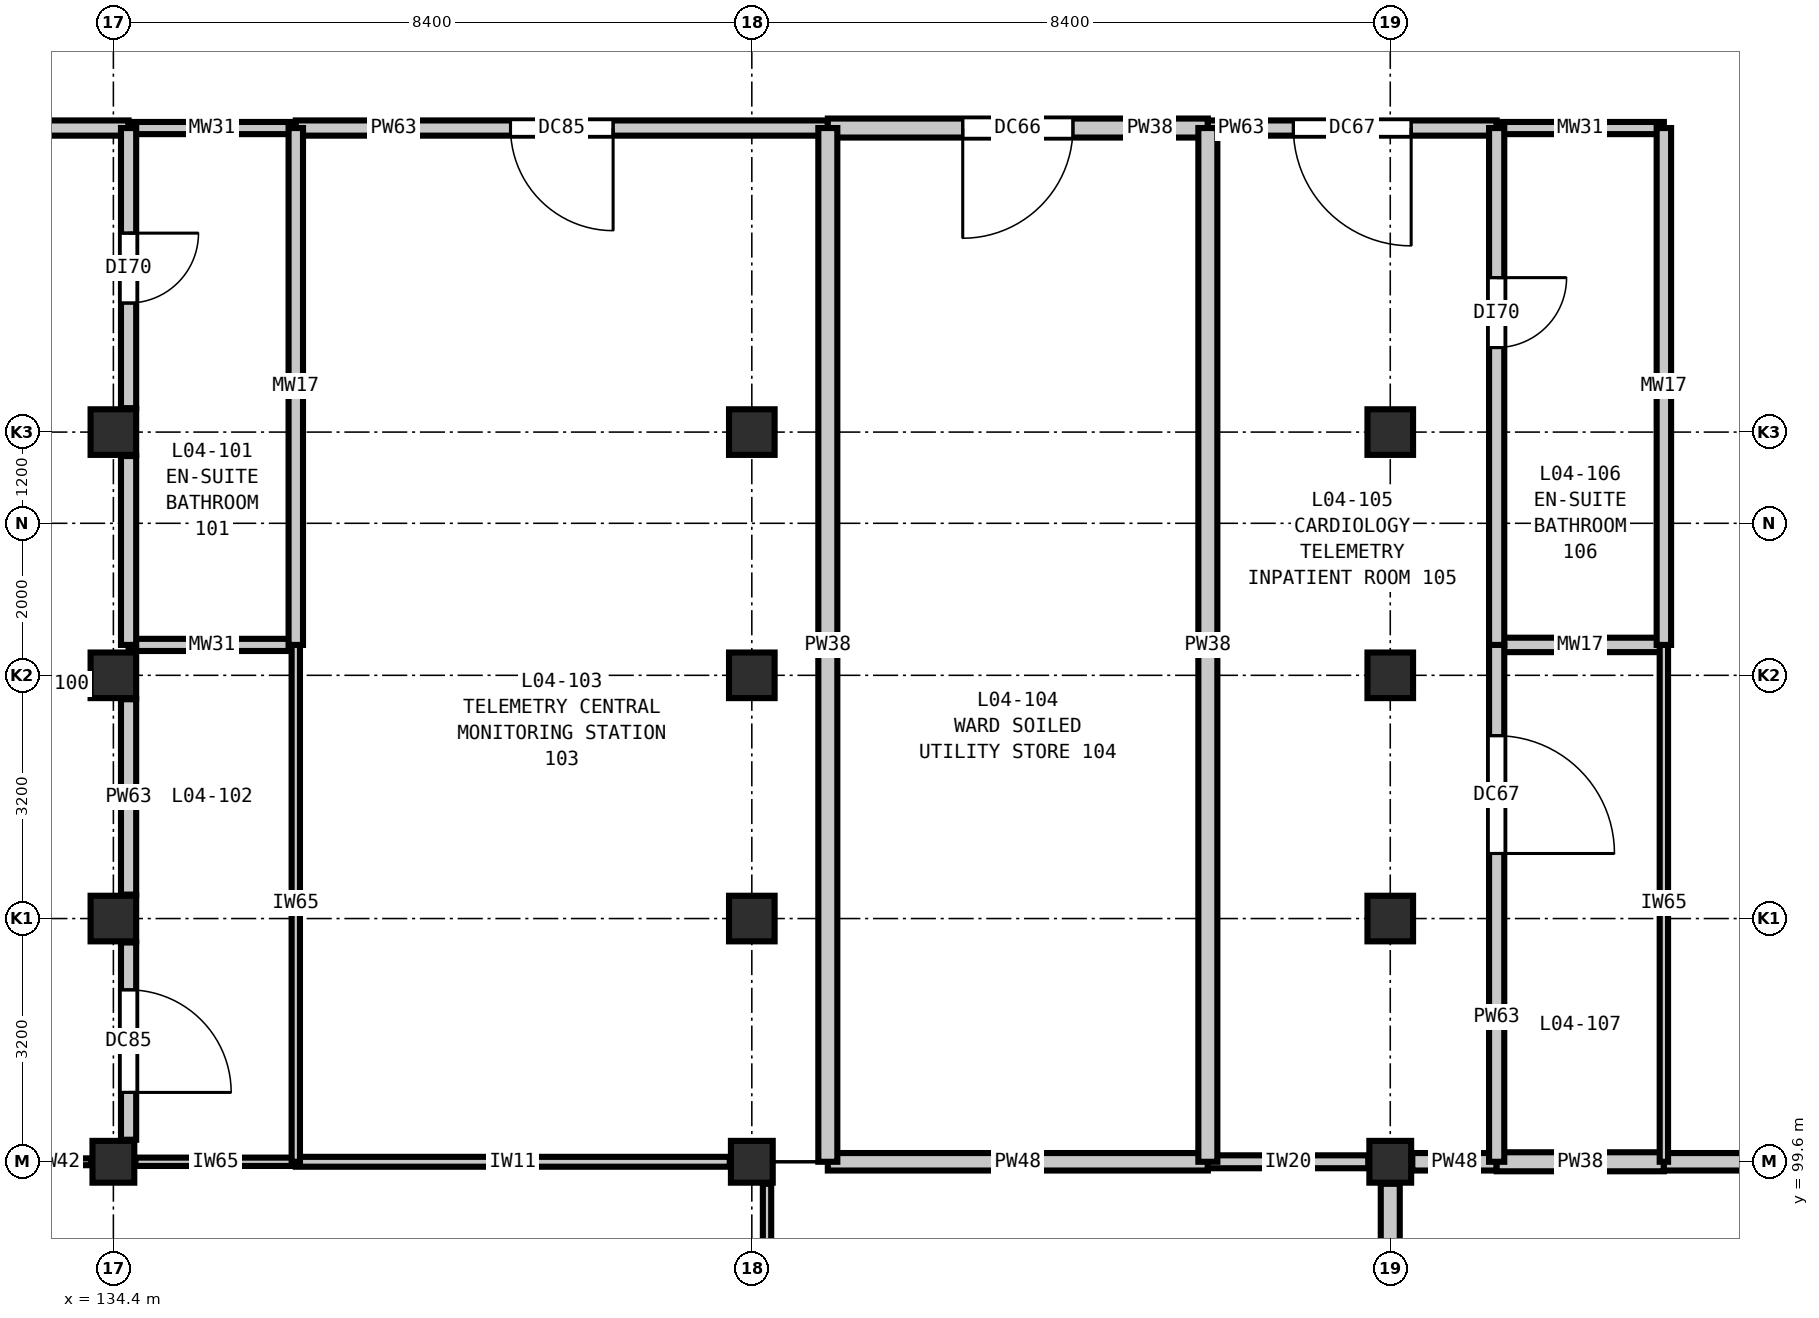
"""IFC4 building model, lengths in metres.
Left out: names, types, materials, properties, quantities, classifications, styles, units other than length and angle.
Written with IfcOpenShell. Run it as: python <this file> out.ifc"""

import sys

from ifc_helpers import new_model, si_unit, direction, frame, frame_2d, origin, origin_2d, place, context, subcontext, project, spatial, rectangle, extrude, element, fill, save


model = new_model("IFC4")
c1 = context("Model", 3, precision=1e-05, world=origin(), true_north=direction((0.0, 1.0)))
c2 = subcontext(c1, "Body", "Model", "MODEL_VIEW")
j1 = project(units=[si_unit("LENGTHUNIT", "METRE"), si_unit("PLANEANGLEUNIT", "RADIAN")], contexts=[c1])
p1 = place(None, origin())
s1 = spatial("IfcSite", under=j1, at=p1, CompositionType="ELEMENT")
p2 = place(p1, origin())
s2 = spatial("IfcBuilding", under=s1, at=p2, CompositionType="ELEMENT")
p3 = place(p2, frame((0.0, 0.0, 20.4)))
s3 = spatial("IfcBuildingStorey", under=s2, at=p3, CompositionType="ELEMENT", Elevation=20.4)
p4 = place(p3, frame((134.4, 99.6, 0.0), z_axis=(0.0, 0.0, 1.0), x_axis=(1.0, 0.0, 0.0)))
e1 = element("IfcColumn", 1, at=p4, inside=s3, PredefinedType="COLUMN", context=c2, shape_type="SweptSolid", body=[
    extrude(rectangle(XDim=0.55, YDim=0.55, at=origin_2d()), origin(), (0.0, 0.0, 1.0), 4.2),
])
for number, where, z_axis, x_axis in (
    (2, (134.4, 102.8, 0.0), (0.0, 0.0, 1.0), (1.0, 0.0, 0.0)),
    (3, (134.4, 106.0, 0.0), (0.0, 0.0, 1.0), (1.0, 0.0, 0.0)),
    (4, (134.4, 109.2, 0.0), (0.0, 0.0, 1.0), (1.0, 0.0, 0.0)),
):
    element("IfcColumn", number, at=place(p3, frame(where, z_axis=z_axis, x_axis=x_axis)), inside=s3, PredefinedType="COLUMN", context=c2, shape_type="SweptSolid", body=[
        extrude(rectangle(XDim=0.6, YDim=0.6, at=origin_2d()), origin(), (0.0, 0.0, 1.0), 4.2),
    ])
p5 = place(p3, frame((142.8, 99.6, 0.0), z_axis=(0.0, 0.0, 1.0), x_axis=(1.0, 0.0, 0.0)))
e5 = element("IfcColumn", 5, at=p5, inside=s3, PredefinedType="COLUMN", context=c2, shape_type="SweptSolid", body=[
    extrude(rectangle(XDim=0.55, YDim=0.55, at=origin_2d()), origin(), (0.0, 0.0, 1.0), 4.2),
])
for number, where, z_axis, x_axis in (
    (6, (142.8, 102.8, 0.0), (0.0, 0.0, 1.0), (1.0, 0.0, 0.0)),
    (7, (142.8, 106.0, 0.0), (0.0, 0.0, 1.0), (1.0, 0.0, 0.0)),
    (8, (142.8, 109.2, 0.0), (0.0, 0.0, 1.0), (1.0, 0.0, 0.0)),
):
    element("IfcColumn", number, at=place(p3, frame(where, z_axis=z_axis, x_axis=x_axis)), inside=s3, PredefinedType="COLUMN", context=c2, shape_type="SweptSolid", body=[
        extrude(rectangle(XDim=0.6, YDim=0.6, at=origin_2d()), origin(), (0.0, 0.0, 1.0), 4.2),
    ])
p6 = place(p3, frame((151.2, 99.6, 0.0), z_axis=(0.0, 0.0, 1.0), x_axis=(1.0, 0.0, 0.0)))
e9 = element("IfcColumn", 9, at=p6, inside=s3, PredefinedType="COLUMN", context=c2, shape_type="SweptSolid", body=[
    extrude(rectangle(XDim=0.55, YDim=0.55, at=origin_2d()), origin(), (0.0, 0.0, 1.0), 4.2),
])
for number, where, z_axis, x_axis in (
    (10, (151.2, 102.8, 0.0), (0.0, 0.0, 1.0), (1.0, 0.0, 0.0)),
    (11, (151.2, 106.0, 0.0), (0.0, 0.0, 1.0), (1.0, 0.0, 0.0)),
    (12, (151.2, 109.2, 0.0), (0.0, 0.0, 1.0), (1.0, 0.0, 0.0)),
):
    element("IfcColumn", number, at=place(p3, frame(where, z_axis=z_axis, x_axis=x_axis)), inside=s3, PredefinedType="COLUMN", context=c2, shape_type="SweptSolid", body=[
        extrude(rectangle(XDim=0.6, YDim=0.6, at=origin_2d()), origin(), (0.0, 0.0, 1.0), 4.2),
    ])
p7 = place(p3, frame((133.2, 99.6, 0.0), z_axis=(0.0, 0.0, 1.0), x_axis=(1.0, 0.0, 0.0)))
e13 = element("IfcWall", 13, at=p7, inside=s3, PredefinedType="PARTITIONING", context=c2, shape_type="SweptSolid", body=[
    extrude(rectangle(XDim=0.91, YDim=0.09, at=frame_2d((0.455, 0.0))), origin(), (0.0, 0.0, 1.0), 3.585),
])
p8 = place(p3, frame((134.69, 99.6, 0.0), z_axis=(0.0, 0.0, 1.0), x_axis=(1.0, 0.0, 0.0)))
e14 = element("IfcWall", 14, at=p8, inside=s3, PredefinedType="PARTITIONING", context=c2, shape_type="SweptSolid", body=[
    extrude(rectangle(XDim=2.11, YDim=0.11, at=frame_2d((1.055, 0.0))), origin(), (0.0, 0.0, 1.0), 3.585),
])
p9 = place(p3, frame((136.8, 99.6, 0.0), z_axis=(0.0, 0.0, 1.0), x_axis=(1.0, 0.0, 0.0)))
e15 = element("IfcWall", 15, at=p9, inside=s3, PredefinedType="PARTITIONING", context=c2, shape_type="SweptSolid", body=[
    extrude(rectangle(XDim=5.71, YDim=0.13, at=frame_2d((2.855, 0.0))), origin(), (0.0, 0.0, 1.0), 3.585),
])
p10 = place(p3, frame((143.8, 99.6, 0.0), z_axis=(0.0, 0.0, 1.0), x_axis=(1.0, 0.0, 0.0)))
e16 = element("IfcWall", 16, at=p10, inside=s3, PredefinedType="PARTITIONING", context=c2, shape_type="SweptSolid", body=[
    extrude(rectangle(XDim=5.0, YDim=0.23, at=frame_2d((2.5, 0.0))), origin(), (0.0, 0.0, 1.0), 3.585),
])
p11 = place(p3, frame((148.8, 99.6, 0.0), z_axis=(0.0, 0.0, 1.0), x_axis=(1.0, 0.0, 0.0)))
e17 = element("IfcWall", 17, at=p11, inside=s3, PredefinedType="PARTITIONING", context=c2, shape_type="SweptSolid", body=[
    extrude(rectangle(XDim=2.11, YDim=0.17, at=frame_2d((1.055, 0.0))), origin(), (0.0, 0.0, 1.0), 3.585),
])
p12 = place(p3, frame((151.49, 99.6, 0.0), z_axis=(0.0, 0.0, 1.0), x_axis=(1.0, 0.0, 0.0)))
e18 = element("IfcWall", 18, at=p12, inside=s3, PredefinedType="PARTITIONING", context=c2, shape_type="SweptSolid", body=[
    extrude(rectangle(XDim=1.11, YDim=0.23, at=frame_2d((0.555, 0.0))), origin(), (0.0, 0.0, 1.0), 3.585),
])
p13 = place(p3, frame((152.6, 99.6, 0.0), z_axis=(0.0, 0.0, 1.0), x_axis=(1.0, 0.0, 0.0)))
e19 = element("IfcWall", 19, at=p13, inside=s3, PredefinedType="PARTITIONING", context=c2, shape_type="SweptSolid", body=[
    extrude(rectangle(XDim=2.2, YDim=0.25, at=frame_2d((1.1, 0.0))), origin(), (0.0, 0.0, 1.0), 3.585),
])
p14 = place(p3, frame((154.8, 99.6, 0.0), z_axis=(0.0, 0.0, 1.0), x_axis=(1.0, 0.0, 0.0)))
e20 = element("IfcWall", 20, at=p14, inside=s3, PredefinedType="PARTITIONING", context=c2, shape_type="SweptSolid", body=[
    extrude(rectangle(XDim=4.485, YDim=0.23, at=frame_2d((2.242, 0.0))), origin(), (0.0, 0.0, 1.0), 3.585),
])
p15 = place(p3, frame((134.6, 106.4, 0.0), z_axis=(0.0, 0.0, 1.0), x_axis=(1.0, 0.0, 0.0)))
e21 = element("IfcWall", 21, at=p15, inside=s3, PredefinedType="PLUMBINGWALL", context=c2, shape_type="SweptSolid", body=[
    extrude(rectangle(XDim=2.2, YDim=0.16, at=frame_2d((1.1, 0.0))), origin(), (0.0, 0.0, 1.0), 3.82),
])
p16 = place(p3, frame((152.6, 106.4, 0.0), z_axis=(0.0, 0.0, 1.0), x_axis=(1.0, 0.0, 0.0)))
e22 = element("IfcWall", 22, at=p16, inside=s3, PredefinedType="PLUMBINGWALL", context=c2, shape_type="SweptSolid", body=[
    extrude(rectangle(XDim=2.2, YDim=0.19, at=frame_2d((1.1, 0.0))), origin(), (0.0, 0.0, 1.0), 3.82),
])
p17 = place(p3, frame((130.8, 113.2, 0.0), z_axis=(0.0, 0.0, 1.0), x_axis=(1.0, 0.0, 0.0)))
e23 = element("IfcWall", 23, at=p17, inside=s3, PredefinedType="PARTITIONING", context=c2, shape_type="SweptSolid", body=[
    extrude(rectangle(XDim=3.8, YDim=0.2, at=frame_2d((1.9, 0.0))), origin(), (0.0, 0.0, 1.0), 3.82),
])
p18 = place(p17, frame((1.25, 0.0, 0.0)))
e24 = element("IfcOpeningElement", 24, at=p18, cuts=e23, PredefinedType="OPENING", context=c2, shape_type="SweptSolid", body=[
    extrude(rectangle(XDim=1.3, YDim=2.2, at=frame_2d((0.65, 1.1))), frame((0.0, 0.11, 0.0), z_axis=(0.0, -1.0, 0.0), x_axis=(1.0, 0.0, 0.0)), (0.0, 0.0, 1.0), 0.22),
])
p19 = place(p3, frame((134.6, 113.2, 0.0), z_axis=(0.0, 0.0, 1.0), x_axis=(1.0, 0.0, 0.0)))
e25 = element("IfcWall", 25, at=p19, inside=s3, PredefinedType="PLUMBINGWALL", context=c2, shape_type="SweptSolid", body=[
    extrude(rectangle(XDim=2.2, YDim=0.16, at=frame_2d((1.1, 0.0))), origin(), (0.0, 0.0, 1.0), 3.82),
])
p20 = place(p3, frame((136.8, 113.2, 0.0), z_axis=(0.0, 0.0, 1.0), x_axis=(1.0, 0.0, 0.0)))
e26 = element("IfcWall", 26, at=p20, inside=s3, PredefinedType="PARTITIONING", context=c2, shape_type="SweptSolid", body=[
    extrude(rectangle(XDim=7.0, YDim=0.2, at=frame_2d((3.5, 0.0))), origin(), (0.0, 0.0, 1.0), 3.82),
])
p21 = place(p20, frame((2.825, 0.0, 0.0)))
e27 = element("IfcOpeningElement", 27, at=p21, cuts=e26, PredefinedType="OPENING", context=c2, shape_type="SweptSolid", body=[
    extrude(rectangle(XDim=1.35, YDim=2.2, at=frame_2d((0.675, 1.1))), frame((0.0, 0.11, 0.0), z_axis=(0.0, -1.0, 0.0), x_axis=(1.0, 0.0, 0.0)), (0.0, 0.0, 1.0), 0.22),
])
p22 = place(p3, frame((143.8, 113.2, 0.0), z_axis=(0.0, 0.0, 1.0), x_axis=(1.0, 0.0, 0.0)))
e28 = element("IfcWall", 28, at=p22, inside=s3, PredefinedType="PARTITIONING", context=c2, shape_type="SweptSolid", body=[
    extrude(rectangle(XDim=5.0, YDim=0.25, at=frame_2d((2.5, 0.0))), origin(), (0.0, 0.0, 1.0), 3.82),
])
p23 = place(p22, frame((1.775, 0.0, 0.0)))
e29 = element("IfcOpeningElement", 29, at=p23, cuts=e28, PredefinedType="OPENING", context=c2, shape_type="SweptSolid", body=[
    extrude(rectangle(XDim=1.45, YDim=2.25, at=frame_2d((0.725, 1.125))), frame((0.0, 0.135, 0.0), z_axis=(0.0, -1.0, 0.0), x_axis=(1.0, 0.0, 0.0)), (0.0, 0.0, 1.0), 0.27),
])
p24 = place(p3, frame((148.8, 113.2, 0.0), z_axis=(0.0, 0.0, 1.0), x_axis=(1.0, 0.0, 0.0)))
e30 = element("IfcWall", 30, at=p24, inside=s3, PredefinedType="PARTITIONING", context=c2, shape_type="SweptSolid", body=[
    extrude(rectangle(XDim=3.8, YDim=0.2, at=frame_2d((1.9, 0.0))), origin(), (0.0, 0.0, 1.0), 3.82),
])
p25 = place(p24, frame((1.125, 0.0, 0.0)))
e31 = element("IfcOpeningElement", 31, at=p25, cuts=e30, PredefinedType="OPENING", context=c2, shape_type="SweptSolid", body=[
    extrude(rectangle(XDim=1.55, YDim=2.25, at=frame_2d((0.775, 1.125))), frame((0.0, 0.11, 0.0), z_axis=(0.0, -1.0, 0.0), x_axis=(1.0, 0.0, 0.0)), (0.0, 0.0, 1.0), 0.22),
])
p26 = place(p3, frame((152.6, 113.2, 0.0), z_axis=(0.0, 0.0, 1.0), x_axis=(1.0, 0.0, 0.0)))
e32 = element("IfcWall", 32, at=p26, inside=s3, PredefinedType="PLUMBINGWALL", context=c2, shape_type="SweptSolid", body=[
    extrude(rectangle(XDim=2.2, YDim=0.16, at=frame_2d((1.1, 0.0))), origin(), (0.0, 0.0, 1.0), 3.82),
])
p27 = place(p3, frame((134.6, 99.89, 0.0), z_axis=(0.0, 0.0, 1.0), x_axis=(0.0, 1.0, 0.0)))
e33 = element("IfcWall", 33, at=p27, inside=s3, PredefinedType="PARTITIONING", context=c2, shape_type="SweptSolid", body=[
    extrude(rectangle(XDim=2.595, YDim=0.2, at=frame_2d((1.298, 0.0))), origin(), (0.0, 0.0, 1.0), 3.585),
])
p28 = place(p27, frame((0.623, 0.0, 0.0)))
e34 = element("IfcOpeningElement", 34, at=p28, cuts=e33, PredefinedType="OPENING", context=c2, shape_type="SweptSolid", body=[
    extrude(rectangle(XDim=1.35, YDim=2.2, at=frame_2d((0.675, 1.1))), frame((0.0, 0.11, 0.0), z_axis=(0.0, -1.0, 0.0), x_axis=(1.0, 0.0, 0.0)), (0.0, 0.0, 1.0), 0.22),
])
p29 = place(p3, frame((134.6, 103.115, 0.0), z_axis=(0.0, 0.0, 1.0), x_axis=(0.0, 1.0, 0.0)))
e35 = element("IfcWall", 35, at=p29, inside=s3, PredefinedType="PARTITIONING", context=c2, shape_type="SweptSolid", body=[
    extrude(rectangle(XDim=2.57, YDim=0.2, at=frame_2d((1.285, 0.0))), origin(), (0.0, 0.0, 1.0), 3.585),
])
p30 = place(p3, frame((134.6, 109.515, 0.0), z_axis=(0.0, 0.0, 1.0), x_axis=(0.0, 1.0, 0.0)))
e36 = element("IfcWall", 36, at=p30, inside=s3, PredefinedType="PARTITIONING", context=c2, shape_type="SweptSolid", body=[
    extrude(rectangle(XDim=3.685, YDim=0.2, at=frame_2d((1.843, 0.0))), origin(), (0.0, 0.0, 1.0), 3.585),
])
p31 = place(p30, frame((1.383, 0.0, 0.0)))
e37 = element("IfcOpeningElement", 37, at=p31, cuts=e36, PredefinedType="OPENING", context=c2, shape_type="SweptSolid", body=[
    extrude(rectangle(XDim=0.92, YDim=2.1, at=frame_2d((0.46, 1.05))), frame((0.0, 0.11, 0.0), z_axis=(0.0, -1.0, 0.0), x_axis=(1.0, 0.0, 0.0)), (0.0, 0.0, 1.0), 0.22),
])
p32 = place(p3, frame((134.6, 106.4, 0.0), z_axis=(0.0, 0.0, 1.0), x_axis=(0.0, 1.0, 0.0)))
e38 = element("IfcWall", 38, at=p32, inside=s3, PredefinedType="PARTITIONING", context=c2, shape_type="SweptSolid", body=[
    extrude(rectangle(XDim=2.485, YDim=0.2, at=frame_2d((1.243, 0.0))), origin(), (0.0, 0.0, 1.0), 3.585),
])
p33 = place(p3, frame((136.8, 99.6, 0.0), z_axis=(0.0, 0.0, 1.0), x_axis=(0.0, 1.0, 0.0)))
e39 = element("IfcWall", 39, at=p33, inside=s3, PredefinedType="PARTITIONING", context=c2, shape_type="SweptSolid", body=[
    extrude(rectangle(XDim=6.8, YDim=0.11, at=frame_2d((3.4, 0.0))), origin(), (0.0, 0.0, 1.0), 3.82),
])
p34 = place(p3, frame((136.8, 106.4, 0.0), z_axis=(0.0, 0.0, 1.0), x_axis=(0.0, 1.0, 0.0)))
e40 = element("IfcWall", 40, at=p34, inside=s3, PredefinedType="PLUMBINGWALL", context=c2, shape_type="SweptSolid", body=[
    extrude(rectangle(XDim=6.8, YDim=0.19, at=frame_2d((3.4, 0.0))), origin(), (0.0, 0.0, 1.0), 3.82),
])
p35 = place(p3, frame((143.0, 91.49, 0.0), z_axis=(0.0, 0.0, 1.0), x_axis=(0.0, 1.0, 0.0)))
e41 = element("IfcWall", 41, at=p35, inside=s3, PredefinedType="PARTITIONING", context=c2, shape_type="SweptSolid", body=[
    extrude(rectangle(XDim=7.82, YDim=0.11, at=frame_2d((3.91, 0.0))), origin(), (0.0, 0.0, 1.0), 3.585),
])
for number, where, z_axis, x_axis in (
    (42, (143.8, 99.6, 0.0), (0.0, 0.0, 1.0), (0.0, 1.0, 0.0)),
    (43, (148.8, 99.6, 0.0), (0.0, 0.0, 1.0), (0.0, 1.0, 0.0)),
):
    element("IfcWall", number, at=place(p3, frame(where, z_axis=z_axis, x_axis=x_axis)), inside=s3, PredefinedType="PARTITIONING", context=c2, shape_type="SweptSolid", body=[
        extrude(rectangle(XDim=13.6, YDim=0.25, at=frame_2d((6.8, 0.0))), origin(), (0.0, 0.0, 1.0), 3.82),
    ])
p36 = place(p3, frame((151.2, 95.8, 0.0), z_axis=(0.0, 0.0, 1.0), x_axis=(0.0, 1.0, 0.0)))
e44 = element("IfcWall", 44, at=p36, inside=s3, PredefinedType="PARTITIONING", context=c2, shape_type="SweptSolid", body=[
    extrude(rectangle(XDim=3.51, YDim=0.25, at=frame_2d((1.755, 0.0))), origin(), (0.0, 0.0, 1.0), 3.585),
])
p37 = place(p3, frame((152.6, 99.6, 0.0), z_axis=(0.0, 0.0, 1.0), x_axis=(0.0, 1.0, 0.0)))
e45 = element("IfcWall", 45, at=p37, inside=s3, PredefinedType="PARTITIONING", context=c2, shape_type="SweptSolid", body=[
    extrude(rectangle(XDim=6.8, YDim=0.2, at=frame_2d((3.4, 0.0))), origin(), (0.0, 0.0, 1.0), 3.82),
])
p38 = place(p37, frame((4.056, 0.0, 0.0)))
e46 = element("IfcOpeningElement", 46, at=p38, cuts=e45, PredefinedType="OPENING", context=c2, shape_type="SweptSolid", body=[
    extrude(rectangle(XDim=1.55, YDim=2.25, at=frame_2d((0.775, 1.125))), frame((0.0, 0.11, 0.0), z_axis=(0.0, -1.0, 0.0), x_axis=(1.0, 0.0, 0.0)), (0.0, 0.0, 1.0), 0.22),
])
p39 = place(p3, frame((152.6, 106.4, 0.0), z_axis=(0.0, 0.0, 1.0), x_axis=(0.0, 1.0, 0.0)))
e47 = element("IfcWall", 47, at=p39, inside=s3, PredefinedType="PARTITIONING", context=c2, shape_type="SweptSolid", body=[
    extrude(rectangle(XDim=6.8, YDim=0.2, at=frame_2d((3.4, 0.0))), origin(), (0.0, 0.0, 1.0), 3.82),
])
p40 = place(p39, frame((3.912, 0.0, 0.0)))
e48 = element("IfcOpeningElement", 48, at=p40, cuts=e47, PredefinedType="OPENING", context=c2, shape_type="SweptSolid", body=[
    extrude(rectangle(XDim=0.92, YDim=2.1, at=frame_2d((0.46, 1.05))), frame((0.0, 0.11, 0.0), z_axis=(0.0, -1.0, 0.0), x_axis=(1.0, 0.0, 0.0)), (0.0, 0.0, 1.0), 0.22),
])
p41 = place(p3, frame((154.8, 99.6, 0.0), z_axis=(0.0, 0.0, 1.0), x_axis=(0.0, 1.0, 0.0)))
e49 = element("IfcWall", 49, at=p41, inside=s3, PredefinedType="PARTITIONING", context=c2, shape_type="SweptSolid", body=[
    extrude(rectangle(XDim=6.8, YDim=0.11, at=frame_2d((3.4, 0.0))), origin(), (0.0, 0.0, 1.0), 3.82),
])
p42 = place(p3, frame((154.8, 106.4, 0.0), z_axis=(0.0, 0.0, 1.0), x_axis=(0.0, 1.0, 0.0)))
e50 = element("IfcWall", 50, at=p42, inside=s3, PredefinedType="PLUMBINGWALL", context=c2, shape_type="SweptSolid", body=[
    extrude(rectangle(XDim=6.8, YDim=0.19, at=frame_2d((3.4, 0.0))), origin(), (0.0, 0.0, 1.0), 3.82),
])
p43 = place(p21, frame((1.35, 0.0, 0.0), z_axis=(0.0, 0.0, 1.0), x_axis=(-1.0, 0.0, 0.0)))
e51 = element("IfcDoor", 51, at=p43, inside=s3, OperationType="SINGLE_SWING_LEFT", PredefinedType="DOOR", context=c2, shape_type="SweptSolid", body=[
    extrude(rectangle(XDim=1.35, YDim=2.2, at=frame_2d((0.675, 1.1))), frame((0.0, 0.025, 0.0), z_axis=(0.0, -1.0, 0.0), x_axis=(1.0, 0.0, 0.0)), (0.0, 0.0, 1.0), 0.05),
])
fill(e27, e51)
p44 = place(p23, frame((1.45, 0.0, 0.0), z_axis=(0.0, 0.0, 1.0), x_axis=(-1.0, 0.0, 0.0)))
e52 = element("IfcDoor", 52, at=p44, inside=s3, OperationType="SINGLE_SWING_RIGHT", PredefinedType="DOOR", context=c2, shape_type="SweptSolid", body=[
    extrude(rectangle(XDim=1.45, YDim=2.25, at=frame_2d((0.725, 1.125))), frame((0.0, 0.025, 0.0), z_axis=(0.0, -1.0, 0.0), x_axis=(1.0, 0.0, 0.0)), (0.0, 0.0, 1.0), 0.05),
])
fill(e29, e52)
p45 = place(p25, frame((1.55, 0.0, 0.0), z_axis=(0.0, 0.0, 1.0), x_axis=(-1.0, 0.0, 0.0)))
e53 = element("IfcDoor", 53, at=p45, inside=s3, OperationType="SINGLE_SWING_LEFT", PredefinedType="DOOR", context=c2, shape_type="SweptSolid", body=[
    extrude(rectangle(XDim=1.55, YDim=2.25, at=frame_2d((0.775, 1.125))), frame((0.0, 0.025, 0.0), z_axis=(0.0, -1.0, 0.0), x_axis=(1.0, 0.0, 0.0)), (0.0, 0.0, 1.0), 0.05),
])
fill(e31, e53)
p46 = place(p28, frame((1.35, 0.0, 0.0), z_axis=(0.0, 0.0, 1.0), x_axis=(-1.0, 0.0, 0.0)))
e54 = element("IfcDoor", 54, at=p46, inside=s3, OperationType="SINGLE_SWING_RIGHT", PredefinedType="DOOR", context=c2, shape_type="SweptSolid", body=[
    extrude(rectangle(XDim=1.35, YDim=2.2, at=frame_2d((0.675, 1.1))), frame((0.0, 0.025, 0.0), z_axis=(0.0, -1.0, 0.0), x_axis=(1.0, 0.0, 0.0)), (0.0, 0.0, 1.0), 0.05),
])
fill(e34, e54)
p47 = place(p31, frame((0.92, 0.0, 0.0), z_axis=(0.0, 0.0, 1.0), x_axis=(-1.0, 0.0, 0.0)))
e55 = element("IfcDoor", 55, at=p47, inside=s3, OperationType="SINGLE_SWING_LEFT", PredefinedType="DOOR", context=c2, shape_type="SweptSolid", body=[
    extrude(rectangle(XDim=0.92, YDim=2.1, at=frame_2d((0.46, 1.05))), frame((0.0, 0.025, 0.0), z_axis=(0.0, -1.0, 0.0), x_axis=(1.0, 0.0, 0.0)), (0.0, 0.0, 1.0), 0.05),
])
fill(e37, e55)
p48 = place(p38, frame((1.55, 0.0, 0.0), z_axis=(0.0, 0.0, 1.0), x_axis=(-1.0, 0.0, 0.0)))
e56 = element("IfcDoor", 56, at=p48, inside=s3, OperationType="SINGLE_SWING_RIGHT", PredefinedType="DOOR", context=c2, shape_type="SweptSolid", body=[
    extrude(rectangle(XDim=1.55, YDim=2.25, at=frame_2d((0.775, 1.125))), frame((0.0, 0.025, 0.0), z_axis=(0.0, -1.0, 0.0), x_axis=(1.0, 0.0, 0.0)), (0.0, 0.0, 1.0), 0.05),
])
fill(e46, e56)
p49 = place(p40, frame((0.92, 0.0, 0.0), z_axis=(0.0, 0.0, 1.0), x_axis=(-1.0, 0.0, 0.0)))
e57 = element("IfcDoor", 57, at=p49, inside=s3, OperationType="SINGLE_SWING_LEFT", PredefinedType="DOOR", context=c2, shape_type="SweptSolid", body=[
    extrude(rectangle(XDim=0.92, YDim=2.1, at=frame_2d((0.46, 1.05))), frame((0.0, 0.025, 0.0), z_axis=(0.0, -1.0, 0.0), x_axis=(1.0, 0.0, 0.0)), (0.0, 0.0, 1.0), 0.05),
])
fill(e48, e57)
save(model, sys.argv[1])
